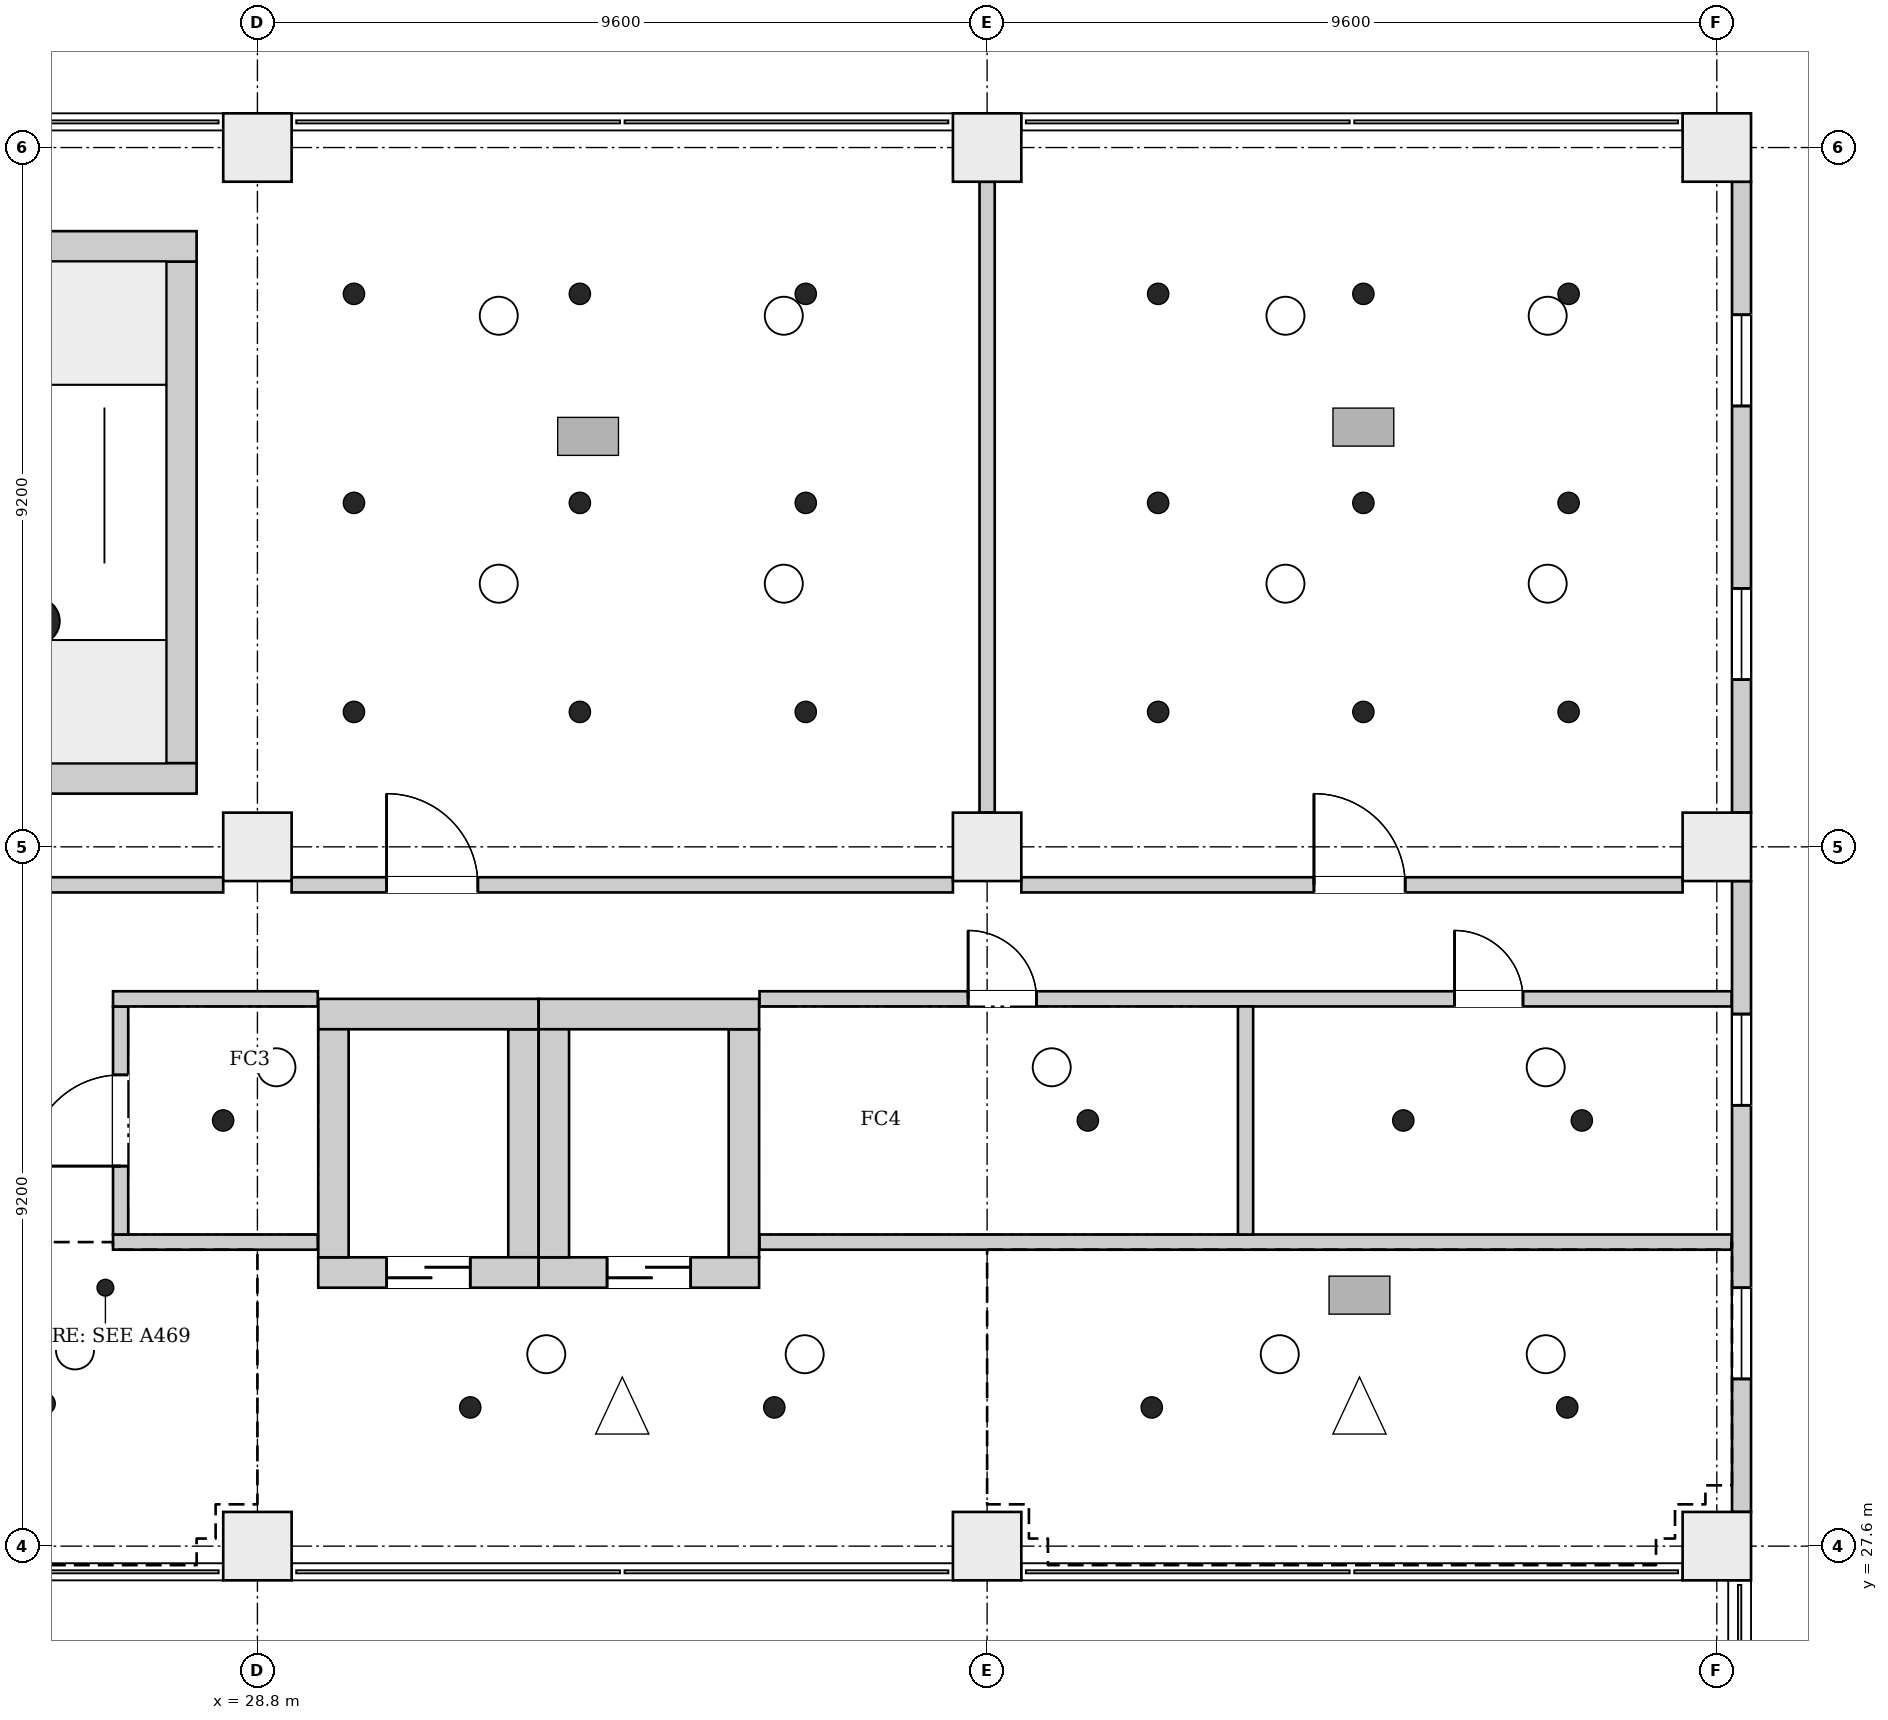
"""IFC4 building model, lengths in metres.
Left out: names, types, materials, properties, quantities, classifications, styles, units other than length and angle.
Written with IfcOpenShell. Run it as: python <this file> out.ifc"""

import sys

from ifc_helpers import new_model, si_unit, direction, frame, frame_2d, origin, origin_2d, place, context, subcontext, project, spatial, rectangle, extrude, element, fill, save


model = new_model("IFC4")
c1 = context("Model", 3, precision=1e-05, world=origin(), true_north=direction((0.0, 1.0)))
c2 = subcontext(c1, "Body", "Model", "MODEL_VIEW")
j1 = project(units=[si_unit("LENGTHUNIT", "METRE"), si_unit("PLANEANGLEUNIT", "RADIAN")], contexts=[c1])
p1 = place(None, origin())
s1 = spatial("IfcSite", under=j1, at=p1, CompositionType="ELEMENT")
p2 = place(p1, origin())
s2 = spatial("IfcBuilding", under=s1, at=p2, CompositionType="ELEMENT")
p3 = place(p2, frame((0.0, 0.0, 36.1)))
s3 = spatial("IfcBuildingStorey", under=s2, at=p3, CompositionType="ELEMENT", Elevation=36.1)
for number, where, z_axis, x_axis in (
    (1, (23.8, 37.7, 0.0), (0.0, 0.0, 1.0), (1.0, 0.0, 0.0)),
    (2, (23.8, 44.7, 0.0), (0.0, 0.0, 1.0), (1.0, 0.0, 0.0)),
):
    element("IfcWall", number, at=place(p3, frame(where, z_axis=z_axis, x_axis=x_axis)), inside=s3, PredefinedType="SHEAR", context=c2, shape_type="SweptSolid", body=[
        extrude(rectangle(XDim=4.2, YDim=0.4, at=frame_2d((2.1, 0.0))), origin(), (0.0, 0.0, 1.0), 4.2),
    ])
p4 = place(p3, frame((27.8, 37.9, 0.0), z_axis=(0.0, 0.0, 1.0), x_axis=(0.0, 1.0, 0.0)))
e3 = element("IfcWall", 3, at=p4, inside=s3, PredefinedType="SHEAR", context=c2, shape_type="SweptSolid", body=[
    extrude(rectangle(XDim=6.6, YDim=0.4, at=frame_2d((3.3, 0.0))), origin(), (0.0, 0.0, 1.0), 4.2),
])
p5 = place(p3, frame((29.6, 31.2, 0.0), z_axis=(0.0, 0.0, 1.0), x_axis=(1.0, 0.0, 0.0)))
e4 = element("IfcWall", 4, at=p5, inside=s3, PredefinedType="SHEAR", context=c2, shape_type="SweptSolid", body=[
    extrude(rectangle(XDim=2.9, YDim=0.4, at=frame_2d((1.45, 0.0))), origin(), (0.0, 0.0, 1.0), 4.2),
])
p6 = place(p5, frame((0.9, 0.0, 0.0)))
e5 = element("IfcOpeningElement", 5, at=p6, cuts=e4, PredefinedType="OPENING", context=c2, shape_type="SweptSolid", body=[
    extrude(rectangle(XDim=1.1, YDim=2.1, at=frame_2d((0.55, 1.05))), frame((0.0, 0.21, 0.0), z_axis=(0.0, -1.0, 0.0), x_axis=(1.0, 0.0, 0.0)), (0.0, 0.0, 1.0), 0.42),
])
p7 = place(p3, frame((29.6, 34.6, 0.0), z_axis=(0.0, 0.0, 1.0), x_axis=(1.0, 0.0, 0.0)))
e6 = element("IfcWall", 6, at=p7, inside=s3, PredefinedType="SHEAR", context=c2, shape_type="SweptSolid", body=[
    extrude(rectangle(XDim=2.9, YDim=0.4, at=frame_2d((1.45, 0.0))), origin(), (0.0, 0.0, 1.0), 4.2),
])
for number, where, z_axis, x_axis in (
    (7, (29.8, 31.4, 0.0), (0.0, 0.0, 1.0), (0.0, 1.0, 0.0)),
    (8, (32.3, 31.4, 0.0), (0.0, 0.0, 1.0), (0.0, 1.0, 0.0)),
):
    element("IfcWall", number, at=place(p3, frame(where, z_axis=z_axis, x_axis=x_axis)), inside=s3, PredefinedType="SHEAR", context=c2, shape_type="SweptSolid", body=[
        extrude(rectangle(XDim=3.0, YDim=0.4, at=frame_2d((1.5, 0.0))), origin(), (0.0, 0.0, 1.0), 4.2),
    ])
p8 = place(p3, frame((32.5, 31.2, 0.0), z_axis=(0.0, 0.0, 1.0), x_axis=(1.0, 0.0, 0.0)))
e9 = element("IfcWall", 9, at=p8, inside=s3, PredefinedType="SHEAR", context=c2, shape_type="SweptSolid", body=[
    extrude(rectangle(XDim=2.9, YDim=0.4, at=frame_2d((1.45, 0.0))), origin(), (0.0, 0.0, 1.0), 4.2),
])
p9 = place(p8, frame((0.9, 0.0, 0.0)))
e10 = element("IfcOpeningElement", 10, at=p9, cuts=e9, PredefinedType="OPENING", context=c2, shape_type="SweptSolid", body=[
    extrude(rectangle(XDim=1.1, YDim=2.1, at=frame_2d((0.55, 1.05))), frame((0.0, 0.21, 0.0), z_axis=(0.0, -1.0, 0.0), x_axis=(1.0, 0.0, 0.0)), (0.0, 0.0, 1.0), 0.42),
])
p10 = place(p3, frame((32.5, 34.6, 0.0), z_axis=(0.0, 0.0, 1.0), x_axis=(1.0, 0.0, 0.0)))
e11 = element("IfcWall", 11, at=p10, inside=s3, PredefinedType="SHEAR", context=c2, shape_type="SweptSolid", body=[
    extrude(rectangle(XDim=2.9, YDim=0.4, at=frame_2d((1.45, 0.0))), origin(), (0.0, 0.0, 1.0), 4.2),
])
for number, where, z_axis, x_axis in (
    (12, (32.7, 31.4, 0.0), (0.0, 0.0, 1.0), (0.0, 1.0, 0.0)),
    (13, (35.2, 31.4, 0.0), (0.0, 0.0, 1.0), (0.0, 1.0, 0.0)),
):
    element("IfcWall", number, at=place(p3, frame(where, z_axis=z_axis, x_axis=x_axis)), inside=s3, PredefinedType="SHEAR", context=c2, shape_type="SweptSolid", body=[
        extrude(rectangle(XDim=3.0, YDim=0.4, at=frame_2d((1.5, 0.0))), origin(), (0.0, 0.0, 1.0), 4.2),
    ])
for number, where, z_axis, x_axis in (
    (14, (28.8, 27.6, 0.0), (0.0, 0.0, 1.0), (1.0, 0.0, 0.0)),
    (15, (38.4, 27.6, 0.0), (0.0, 0.0, 1.0), (1.0, 0.0, 0.0)),
    (16, (48.0, 27.6, 0.0), (0.0, 0.0, 1.0), (1.0, 0.0, 0.0)),
    (17, (28.8, 36.8, 0.0), (0.0, 0.0, 1.0), (1.0, 0.0, 0.0)),
    (18, (38.4, 36.8, 0.0), (0.0, 0.0, 1.0), (1.0, 0.0, 0.0)),
    (19, (48.0, 36.8, 0.0), (0.0, 0.0, 1.0), (1.0, 0.0, 0.0)),
    (20, (28.8, 46.0, 0.0), (0.0, 0.0, 1.0), (1.0, 0.0, 0.0)),
    (21, (38.4, 46.0, 0.0), (0.0, 0.0, 1.0), (1.0, 0.0, 0.0)),
    (22, (48.0, 46.0, 0.0), (0.0, 0.0, 1.0), (1.0, 0.0, 0.0)),
):
    element("IfcColumn", number, at=place(p3, frame(where, z_axis=z_axis, x_axis=x_axis)), inside=s3, PredefinedType="COLUMN", context=c2, shape_type="SweptSolid", body=[
        extrude(rectangle(XDim=0.9, YDim=0.9, at=origin_2d()), origin(), (0.0, 0.0, 1.0), 4.2),
    ])
p11 = place(p3, frame((48.325, 28.05, 0.0), z_axis=(0.0, 0.0, 1.0), x_axis=(0.0, 1.0, 0.0)))
e23 = element("IfcWall", 23, at=p11, inside=s3, PredefinedType="ELEMENTEDWALL", context=c2, shape_type="SweptSolid", body=[
    extrude(rectangle(XDim=8.3, YDim=0.25, at=frame_2d((4.15, 0.0))), origin(), (0.0, 0.0, 1.0), 3.9),
])
p12 = place(p11, frame((1.75, 0.0, 0.9)))
e24 = element("IfcOpeningElement", 24, at=p12, cuts=e23, PredefinedType="OPENING", context=c2, shape_type="SweptSolid", body=[
    extrude(rectangle(XDim=1.2, YDim=2.6, at=frame_2d((0.6, 1.3))), frame((0.0, 0.135, 0.0), z_axis=(0.0, -1.0, 0.0), x_axis=(1.0, 0.0, 0.0)), (0.0, 0.0, 1.0), 0.27),
])
p13 = place(p11, frame((5.35, 0.0, 0.9)))
e25 = element("IfcOpeningElement", 25, at=p13, cuts=e23, PredefinedType="OPENING", context=c2, shape_type="SweptSolid", body=[
    extrude(rectangle(XDim=1.2, YDim=2.6, at=frame_2d((0.6, 1.3))), frame((0.0, 0.135, 0.0), z_axis=(0.0, -1.0, 0.0), x_axis=(1.0, 0.0, 0.0)), (0.0, 0.0, 1.0), 0.27),
])
p14 = place(p3, frame((48.325, 37.25, 0.0), z_axis=(0.0, 0.0, 1.0), x_axis=(0.0, 1.0, 0.0)))
e26 = element("IfcWall", 26, at=p14, inside=s3, PredefinedType="ELEMENTEDWALL", context=c2, shape_type="SweptSolid", body=[
    extrude(rectangle(XDim=8.3, YDim=0.25, at=frame_2d((4.15, 0.0))), origin(), (0.0, 0.0, 1.0), 3.9),
])
p15 = place(p14, frame((1.75, 0.0, 0.9)))
e27 = element("IfcOpeningElement", 27, at=p15, cuts=e26, PredefinedType="OPENING", context=c2, shape_type="SweptSolid", body=[
    extrude(rectangle(XDim=1.2, YDim=2.6, at=frame_2d((0.6, 1.3))), frame((0.0, 0.135, 0.0), z_axis=(0.0, -1.0, 0.0), x_axis=(1.0, 0.0, 0.0)), (0.0, 0.0, 1.0), 0.27),
])
p16 = place(p14, frame((5.35, 0.0, 0.9)))
e28 = element("IfcOpeningElement", 28, at=p16, cuts=e26, PredefinedType="OPENING", context=c2, shape_type="SweptSolid", body=[
    extrude(rectangle(XDim=1.2, YDim=2.6, at=frame_2d((0.6, 1.3))), frame((0.0, 0.135, 0.0), z_axis=(0.0, -1.0, 0.0), x_axis=(1.0, 0.0, 0.0)), (0.0, 0.0, 1.0), 0.27),
])
p17 = place(p3, frame((23.7, 36.3, 0.0), z_axis=(0.0, 0.0, 1.0), x_axis=(1.0, 0.0, 0.0)))
e29 = element("IfcWall", 29, at=p17, inside=s3, PredefinedType="PARTITIONING", context=c2, shape_type="SweptSolid", body=[
    extrude(rectangle(XDim=4.65, YDim=0.2, at=frame_2d((2.325, 0.0))), origin(), (0.0, 0.0, 1.0), 3.9),
])
p18 = place(p3, frame((26.9, 31.6, 0.0), z_axis=(0.0, 0.0, 1.0), x_axis=(1.0, 0.0, 0.0)))
e30 = element("IfcWall", 30, at=p18, inside=s3, PredefinedType="PARTITIONING", context=c2, shape_type="SweptSolid", body=[
    extrude(rectangle(XDim=2.694, YDim=0.2, at=frame_2d((1.347, 0.0))), origin(), (0.0, 0.0, 1.0), 3.9),
])
p19 = place(p3, frame((27.0, 31.7, 0.0), z_axis=(0.0, 0.0, 1.0), x_axis=(0.0, 1.0, 0.0)))
e31 = element("IfcWall", 31, at=p19, inside=s3, PredefinedType="PARTITIONING", context=c2, shape_type="SweptSolid", body=[
    extrude(rectangle(XDim=3.0, YDim=0.2, at=frame_2d((1.5, 0.0))), origin(), (0.0, 0.0, 1.0), 3.9),
])
p20 = place(p19, frame((0.9, 0.0, 0.0)))
e32 = element("IfcOpeningElement", 32, at=p20, cuts=e31, PredefinedType="OPENING", context=c2, shape_type="SweptSolid", body=[
    extrude(rectangle(XDim=1.2, YDim=2.1, at=frame_2d((0.6, 1.05))), frame((0.0, 0.11, 0.0), z_axis=(0.0, -1.0, 0.0), x_axis=(1.0, 0.0, 0.0)), (0.0, 0.0, 1.0), 0.22),
])
p21 = place(p3, frame((26.9, 34.8, 0.0), z_axis=(0.0, 0.0, 1.0), x_axis=(1.0, 0.0, 0.0)))
e33 = element("IfcWall", 33, at=p21, inside=s3, PredefinedType="PARTITIONING", context=c2, shape_type="SweptSolid", body=[
    extrude(rectangle(XDim=2.694, YDim=0.2, at=frame_2d((1.347, 0.0))), origin(), (0.0, 0.0, 1.0), 3.9),
])
p22 = place(p3, frame((29.25, 36.3, 0.0), z_axis=(0.0, 0.0, 1.0), x_axis=(1.0, 0.0, 0.0)))
e34 = element("IfcWall", 34, at=p22, inside=s3, PredefinedType="PARTITIONING", context=c2, shape_type="SweptSolid", body=[
    extrude(rectangle(XDim=8.7, YDim=0.2, at=frame_2d((4.35, 0.0))), origin(), (0.0, 0.0, 1.0), 3.9),
])
p23 = place(p22, frame((1.25, 0.0, 0.0)))
e35 = element("IfcOpeningElement", 35, at=p23, cuts=e34, PredefinedType="OPENING", context=c2, shape_type="SweptSolid", body=[
    extrude(rectangle(XDim=1.2, YDim=2.1, at=frame_2d((0.6, 1.05))), frame((0.0, 0.11, 0.0), z_axis=(0.0, -1.0, 0.0), x_axis=(1.0, 0.0, 0.0)), (0.0, 0.0, 1.0), 0.22),
])
p24 = place(p3, frame((35.406, 31.6, 0.0), z_axis=(0.0, 0.0, 1.0), x_axis=(1.0, 0.0, 0.0)))
e36 = element("IfcWall", 36, at=p24, inside=s3, PredefinedType="PARTITIONING", context=c2, shape_type="SweptSolid", body=[
    extrude(rectangle(XDim=12.788, YDim=0.2, at=frame_2d((6.394, 0.0))), origin(), (0.0, 0.0, 1.0), 3.9),
])
p25 = place(p3, frame((35.406, 34.8, 0.0), z_axis=(0.0, 0.0, 1.0), x_axis=(1.0, 0.0, 0.0)))
e37 = element("IfcWall", 37, at=p25, inside=s3, PredefinedType="PARTITIONING", context=c2, shape_type="SweptSolid", body=[
    extrude(rectangle(XDim=12.788, YDim=0.2, at=frame_2d((6.394, 0.0))), origin(), (0.0, 0.0, 1.0), 3.9),
])
p26 = place(p25, frame((2.744, 0.0, 0.0)))
e38 = element("IfcOpeningElement", 38, at=p26, cuts=e37, PredefinedType="OPENING", context=c2, shape_type="SweptSolid", body=[
    extrude(rectangle(XDim=0.9, YDim=2.1, at=frame_2d((0.45, 1.05))), frame((0.0, 0.11, 0.0), z_axis=(0.0, -1.0, 0.0), x_axis=(1.0, 0.0, 0.0)), (0.0, 0.0, 1.0), 0.22),
])
p27 = place(p25, frame((9.144, 0.0, 0.0)))
e39 = element("IfcOpeningElement", 39, at=p27, cuts=e37, PredefinedType="OPENING", context=c2, shape_type="SweptSolid", body=[
    extrude(rectangle(XDim=0.9, YDim=2.1, at=frame_2d((0.45, 1.05))), frame((0.0, 0.11, 0.0), z_axis=(0.0, -1.0, 0.0), x_axis=(1.0, 0.0, 0.0)), (0.0, 0.0, 1.0), 0.22),
])
p28 = place(p3, frame((38.4, 37.25, 0.0), z_axis=(0.0, 0.0, 1.0), x_axis=(0.0, 1.0, 0.0)))
e40 = element("IfcWall", 40, at=p28, inside=s3, PredefinedType="PARTITIONING", context=c2, shape_type="SweptSolid", body=[
    extrude(rectangle(XDim=8.3, YDim=0.2, at=frame_2d((4.15, 0.0))), origin(), (0.0, 0.0, 1.0), 3.9),
])
p29 = place(p3, frame((38.85, 36.3, 0.0), z_axis=(0.0, 0.0, 1.0), x_axis=(1.0, 0.0, 0.0)))
e41 = element("IfcWall", 41, at=p29, inside=s3, PredefinedType="PARTITIONING", context=c2, shape_type="SweptSolid", body=[
    extrude(rectangle(XDim=8.7, YDim=0.2, at=frame_2d((4.35, 0.0))), origin(), (0.0, 0.0, 1.0), 3.9),
])
p30 = place(p29, frame((3.85, 0.0, 0.0)))
e42 = element("IfcOpeningElement", 42, at=p30, cuts=e41, PredefinedType="OPENING", context=c2, shape_type="SweptSolid", body=[
    extrude(rectangle(XDim=1.2, YDim=2.1, at=frame_2d((0.6, 1.05))), frame((0.0, 0.11, 0.0), z_axis=(0.0, -1.0, 0.0), x_axis=(1.0, 0.0, 0.0)), (0.0, 0.0, 1.0), 0.22),
])
p31 = place(p3, frame((41.8, 31.7, 0.0), z_axis=(0.0, 0.0, 1.0), x_axis=(0.0, 1.0, 0.0)))
e43 = element("IfcWall", 43, at=p31, inside=s3, PredefinedType="PARTITIONING", context=c2, shape_type="SweptSolid", body=[
    extrude(rectangle(XDim=3.0, YDim=0.2, at=frame_2d((1.5, 0.0))), origin(), (0.0, 0.0, 1.0), 3.9),
])
p32 = place(p12, origin())
e44 = element("IfcWindow", 44, at=p32, inside=s3, PartitioningType="SINGLE_PANEL", PredefinedType="WINDOW", context=c2, shape_type="SweptSolid", body=[
    extrude(rectangle(XDim=1.2, YDim=2.6, at=frame_2d((0.6, 1.3))), frame((0.0, 0.03, 0.0), z_axis=(0.0, -1.0, 0.0), x_axis=(1.0, 0.0, 0.0)), (0.0, 0.0, 1.0), 0.06),
])
fill(e24, e44)
p33 = place(p13, origin())
e45 = element("IfcWindow", 45, at=p33, inside=s3, PartitioningType="SINGLE_PANEL", PredefinedType="WINDOW", context=c2, shape_type="SweptSolid", body=[
    extrude(rectangle(XDim=1.2, YDim=2.6, at=frame_2d((0.6, 1.3))), frame((0.0, 0.03, 0.0), z_axis=(0.0, -1.0, 0.0), x_axis=(1.0, 0.0, 0.0)), (0.0, 0.0, 1.0), 0.06),
])
fill(e25, e45)
p34 = place(p15, origin())
e46 = element("IfcWindow", 46, at=p34, inside=s3, PartitioningType="SINGLE_PANEL", PredefinedType="WINDOW", context=c2, shape_type="SweptSolid", body=[
    extrude(rectangle(XDim=1.2, YDim=2.6, at=frame_2d((0.6, 1.3))), frame((0.0, 0.03, 0.0), z_axis=(0.0, -1.0, 0.0), x_axis=(1.0, 0.0, 0.0)), (0.0, 0.0, 1.0), 0.06),
])
fill(e27, e46)
p35 = place(p16, origin())
e47 = element("IfcWindow", 47, at=p35, inside=s3, PartitioningType="SINGLE_PANEL", PredefinedType="WINDOW", context=c2, shape_type="SweptSolid", body=[
    extrude(rectangle(XDim=1.2, YDim=2.6, at=frame_2d((0.6, 1.3))), frame((0.0, 0.03, 0.0), z_axis=(0.0, -1.0, 0.0), x_axis=(1.0, 0.0, 0.0)), (0.0, 0.0, 1.0), 0.06),
])
fill(e28, e47)
p36 = place(p6, origin())
e48 = element("IfcDoor", 48, at=p36, inside=s3, OperationType="DOUBLE_DOOR_SLIDING", PredefinedType="DOOR", context=c2, shape_type="SweptSolid", body=[
    extrude(rectangle(XDim=1.1, YDim=2.1, at=frame_2d((0.55, 1.05))), frame((0.0, 0.025, 0.0), z_axis=(0.0, -1.0, 0.0), x_axis=(1.0, 0.0, 0.0)), (0.0, 0.0, 1.0), 0.05),
])
fill(e5, e48)
p37 = place(p9, origin())
e49 = element("IfcDoor", 49, at=p37, inside=s3, OperationType="DOUBLE_DOOR_SLIDING", PredefinedType="DOOR", context=c2, shape_type="SweptSolid", body=[
    extrude(rectangle(XDim=1.1, YDim=2.1, at=frame_2d((0.55, 1.05))), frame((0.0, 0.025, 0.0), z_axis=(0.0, -1.0, 0.0), x_axis=(1.0, 0.0, 0.0)), (0.0, 0.0, 1.0), 0.05),
])
fill(e10, e49)
p38 = place(p20, origin())
e50 = element("IfcDoor", 50, at=p38, inside=s3, OperationType="SINGLE_SWING_RIGHT", PredefinedType="DOOR", context=c2, shape_type="SweptSolid", body=[
    extrude(rectangle(XDim=1.2, YDim=2.1, at=frame_2d((0.6, 1.05))), frame((0.0, 0.025, 0.0), z_axis=(0.0, -1.0, 0.0), x_axis=(1.0, 0.0, 0.0)), (0.0, 0.0, 1.0), 0.05),
])
fill(e32, e50)
p39 = place(p26, origin())
e51 = element("IfcDoor", 51, at=p39, inside=s3, OperationType="SINGLE_SWING_RIGHT", PredefinedType="DOOR", context=c2, shape_type="SweptSolid", body=[
    extrude(rectangle(XDim=0.9, YDim=2.1, at=frame_2d((0.45, 1.05))), frame((0.0, 0.025, 0.0), z_axis=(0.0, -1.0, 0.0), x_axis=(1.0, 0.0, 0.0)), (0.0, 0.0, 1.0), 0.05),
])
fill(e38, e51)
p40 = place(p27, origin())
e52 = element("IfcDoor", 52, at=p40, inside=s3, OperationType="SINGLE_SWING_LEFT", PredefinedType="DOOR", context=c2, shape_type="SweptSolid", body=[
    extrude(rectangle(XDim=0.9, YDim=2.1, at=frame_2d((0.45, 1.05))), frame((0.0, 0.025, 0.0), z_axis=(0.0, -1.0, 0.0), x_axis=(1.0, 0.0, 0.0)), (0.0, 0.0, 1.0), 0.05),
])
fill(e39, e52)
p41 = place(p23, origin())
e53 = element("IfcDoor", 53, at=p41, inside=s3, OperationType="SINGLE_SWING_LEFT", PredefinedType="DOOR", context=c2, shape_type="SweptSolid", body=[
    extrude(rectangle(XDim=1.2, YDim=2.1, at=frame_2d((0.6, 1.05))), frame((0.0, 0.025, 0.0), z_axis=(0.0, -1.0, 0.0), x_axis=(1.0, 0.0, 0.0)), (0.0, 0.0, 1.0), 0.05),
])
fill(e35, e53)
p42 = place(p30, origin())
e54 = element("IfcDoor", 54, at=p42, inside=s3, OperationType="SINGLE_SWING_RIGHT", PredefinedType="DOOR", context=c2, shape_type="SweptSolid", body=[
    extrude(rectangle(XDim=1.2, YDim=2.1, at=frame_2d((0.6, 1.05))), frame((0.0, 0.025, 0.0), z_axis=(0.0, -1.0, 0.0), x_axis=(1.0, 0.0, 0.0)), (0.0, 0.0, 1.0), 0.05),
])
fill(e42, e54)
save(model, sys.argv[1])
